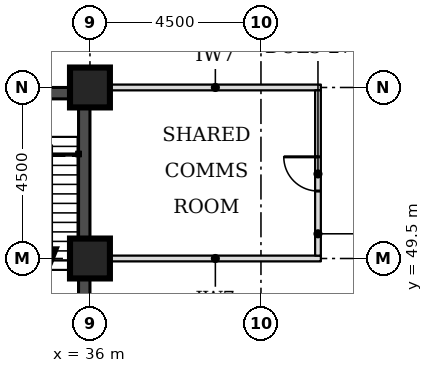
"""IFC4 building model, lengths in metres.
Left out: names, types, materials, properties, quantities, classifications, styles, units other than length and angle.
Written with IfcOpenShell. Run it as: python <this file> out.ifc"""

import sys

from ifc_helpers import new_model, si_unit, direction, frame, frame_2d, origin, origin_2d, place, context, subcontext, project, spatial, rectangle, extrude, element, fill, save


model = new_model("IFC4")
c1 = context("Model", 3, precision=1e-05, world=origin(), true_north=direction((0.0, 1.0)))
c2 = subcontext(c1, "Body", "Model", "MODEL_VIEW")
j1 = project(units=[si_unit("LENGTHUNIT", "METRE"), si_unit("PLANEANGLEUNIT", "RADIAN")], contexts=[c1])
p1 = place(None, origin())
s1 = spatial("IfcSite", under=j1, at=p1, CompositionType="ELEMENT")
p2 = place(p1, origin())
s2 = spatial("IfcBuilding", under=s1, at=p2, CompositionType="ELEMENT")
p3 = place(p2, frame((0.0, 0.0, 97.4)))
s3 = spatial("IfcBuildingStorey", under=s2, at=p3, CompositionType="ELEMENT", Elevation=97.4)
for number, where, z_axis, x_axis in (
    (1, (36.0, 49.5, 0.0), (0.0, 0.0, 1.0), (1.0, 0.0, 0.0)),
    (2, (36.0, 54.0, 0.0), (0.0, 0.0, 1.0), (1.0, 0.0, 0.0)),
):
    element("IfcColumn", number, at=place(p3, frame(where, z_axis=z_axis, x_axis=x_axis)), inside=s3, PredefinedType="COLUMN", context=c2, shape_type="SweptSolid", body=[
        extrude(rectangle(XDim=1.05, YDim=1.05, at=origin_2d()), origin(), (0.0, 0.0, 1.0), 3.7),
    ])
p4 = place(p3, frame((27.3, 53.85, 0.0), z_axis=(0.0, 0.0, 1.0), x_axis=(1.0, 0.0, 0.0)))
e3 = element("IfcWall", 3, at=p4, inside=s3, PredefinedType="SHEAR", context=c2, shape_type="SweptSolid", body=[
    extrude(rectangle(XDim=8.4, YDim=0.3, at=frame_2d((4.2, 0.0))), origin(), (0.0, 0.0, 1.0), 3.7),
])
p5 = place(p4, frame((6.4, 0.0, 0.0)))
e4 = element("IfcOpeningElement", 4, at=p5, cuts=e3, PredefinedType="OPENING", context=c2, shape_type="SweptSolid", body=[
    extrude(rectangle(XDim=1.1, YDim=2.1, at=frame_2d((0.55, 1.05))), frame((0.0, 0.16, 0.0), z_axis=(0.0, -1.0, 0.0), x_axis=(1.0, 0.0, 0.0)), (0.0, 0.0, 1.0), 0.32),
])
p6 = place(p3, frame((35.85, 45.0, 0.0), z_axis=(0.0, 0.0, 1.0), x_axis=(0.0, 1.0, 0.0)))
e5 = element("IfcWall", 5, at=p6, inside=s3, PredefinedType="SHEAR", context=c2, shape_type="SweptSolid", body=[
    extrude(rectangle(XDim=9.0, YDim=0.3, at=frame_2d((4.5, 0.0))), origin(), (0.0, 0.0, 1.0), 3.7),
])
for number, where, z_axis, x_axis in (
    (6, (36.525, 49.5, 0.0), (0.0, 0.0, 1.0), (1.0, 0.0, 0.0)),
    (7, (36.525, 54.0, 0.0), (0.0, 0.0, 1.0), (1.0, 0.0, 0.0)),
):
    element("IfcWall", number, at=place(p3, frame(where, z_axis=z_axis, x_axis=x_axis)), inside=s3, PredefinedType="PARTITIONING", context=c2, shape_type="SweptSolid", body=[
        extrude(rectangle(XDim=5.55, YDim=0.15, at=frame_2d((2.775, 0.0))), origin(), (0.0, 0.0, 1.0), 3.55),
    ])
p7 = place(p3, frame((42.0, 49.575, 0.0), z_axis=(0.0, 0.0, 1.0), x_axis=(0.0, 1.0, 0.0)))
e8 = element("IfcWall", 8, at=p7, inside=s3, PredefinedType="PARTITIONING", context=c2, shape_type="SweptSolid", body=[
    extrude(rectangle(XDim=4.35, YDim=0.15, at=frame_2d((2.175, 0.0))), origin(), (0.0, 0.0, 1.0), 3.55),
])
p8 = place(p7, frame((1.7, 0.0, 0.0)))
e9 = element("IfcOpeningElement", 9, at=p8, cuts=e8, PredefinedType="OPENING", context=c2, shape_type="SweptSolid", body=[
    extrude(rectangle(XDim=0.9, YDim=2.1, at=frame_2d((0.45, 1.05))), frame((0.0, 0.085, 0.0), z_axis=(0.0, -1.0, 0.0), x_axis=(1.0, 0.0, 0.0)), (0.0, 0.0, 1.0), 0.17),
])
p9 = place(p8, origin())
e10 = element("IfcDoor", 10, at=p9, inside=s3, OperationType="SINGLE_SWING_RIGHT", PredefinedType="DOOR", context=c2, shape_type="SweptSolid", body=[
    extrude(rectangle(XDim=0.9, YDim=2.1, at=frame_2d((0.45, 1.05))), frame((0.0, 0.025, 0.0), z_axis=(0.0, -1.0, 0.0), x_axis=(1.0, 0.0, 0.0)), (0.0, 0.0, 1.0), 0.05),
])
fill(e9, e10)
save(model, sys.argv[1])
